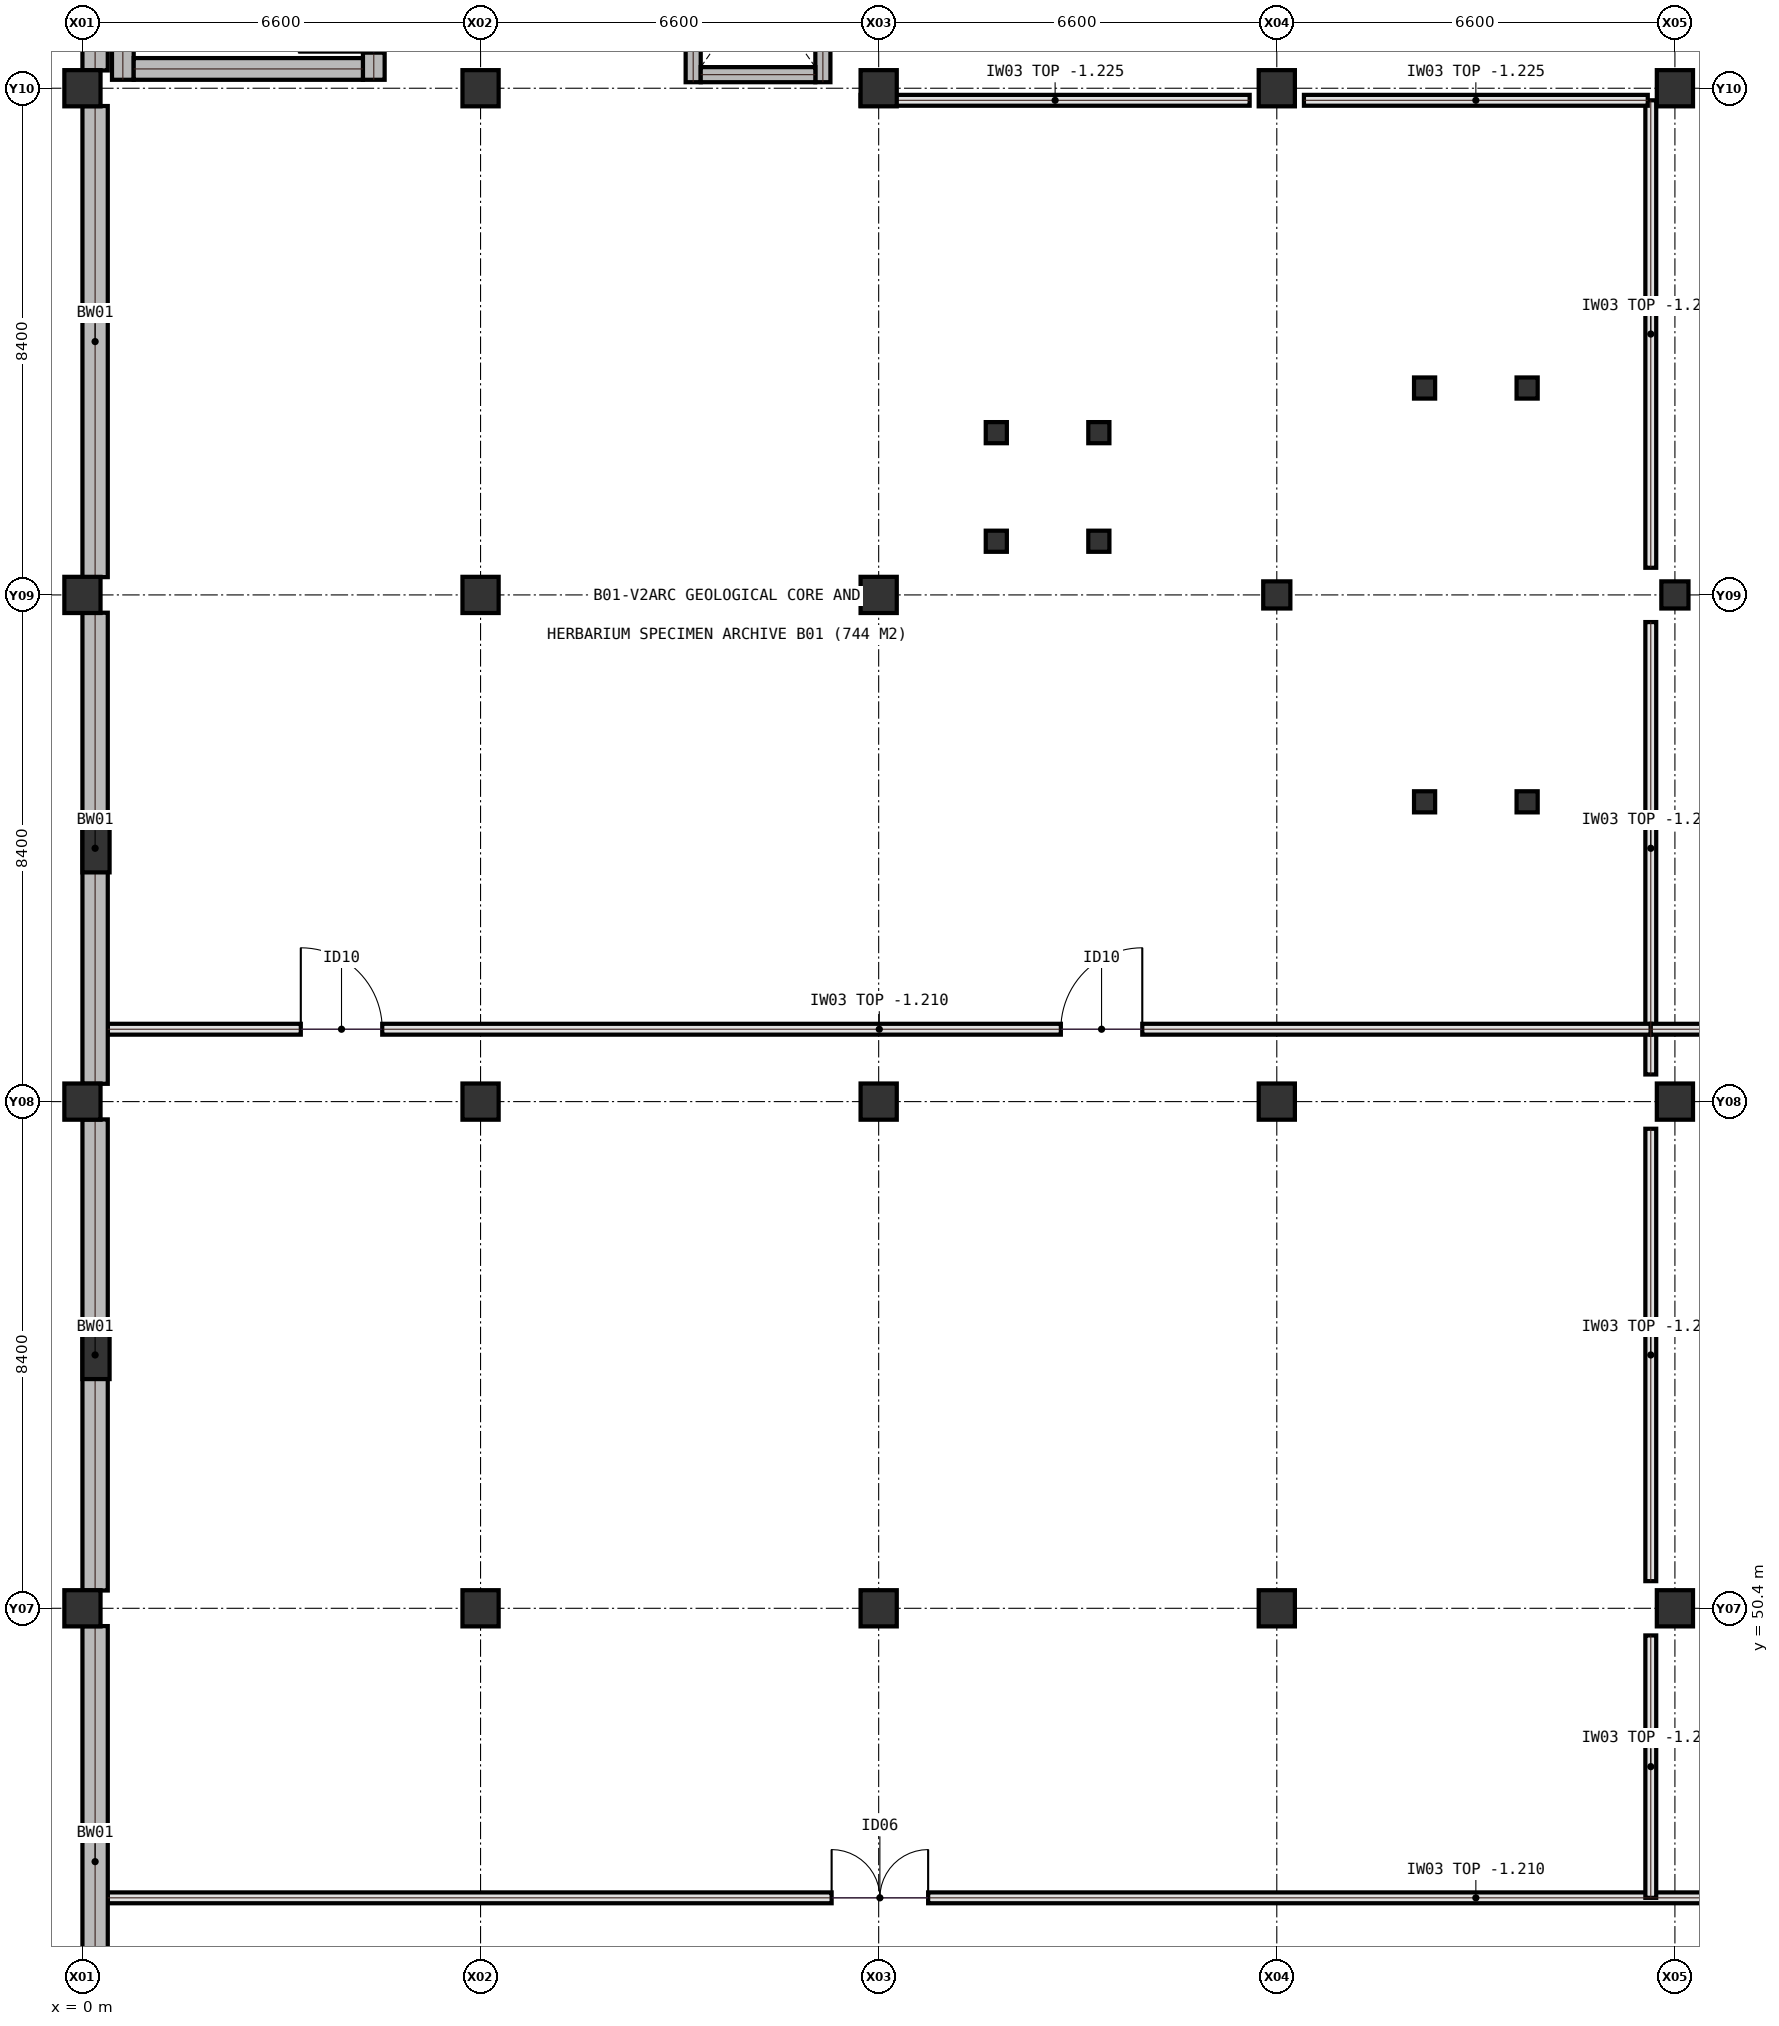
"""IFC4 building model, lengths in metres.
Left out: names, types, materials, properties, quantities, classifications, styles, units other than length and angle.
Written with IfcOpenShell. Run it as: python <this file> out.ifc"""

import sys

from ifc_helpers import new_model, si_unit, direction, frame, frame_2d, origin, origin_2d, place, context, subcontext, project, spatial, rectangle, extrude, element, fill, save


model = new_model("IFC4")
c1 = context("Model", 3, precision=1e-05, world=origin(), true_north=direction((0.0, 1.0)))
c2 = subcontext(c1, "Body", "Model", "MODEL_VIEW")
j1 = project(units=[si_unit("LENGTHUNIT", "METRE"), si_unit("PLANEANGLEUNIT", "RADIAN")], contexts=[c1])
p1 = place(None, origin())
s1 = spatial("IfcSite", under=j1, at=p1, CompositionType="ELEMENT")
p2 = place(p1, origin())
s2 = spatial("IfcBuilding", under=s1, at=p2, CompositionType="ELEMENT")
p3 = place(p2, frame((0.0, 0.0, -4.5)))
s3 = spatial("IfcBuildingStorey", under=s2, at=p3, CompositionType="ELEMENT", Elevation=-4.5)
for number, where, z_axis, x_axis in (
    (1, (0.0, 50.4, 0.0), (0.0, 0.0, 1.0), (1.0, 0.0, 0.0)),
    (2, (0.0, 58.8, 0.0), (0.0, 0.0, 1.0), (1.0, 0.0, 0.0)),
    (3, (0.0, 67.2, 0.0), (0.0, 0.0, 1.0), (1.0, 0.0, 0.0)),
    (4, (0.0, 75.6, 0.0), (0.0, 0.0, 1.0), (1.0, 0.0, 0.0)),
    (5, (6.6, 50.4, 0.0), (0.0, 0.0, 1.0), (1.0, 0.0, 0.0)),
    (6, (6.6, 58.8, 0.0), (0.0, 0.0, 1.0), (1.0, 0.0, 0.0)),
    (7, (6.6, 67.2, 0.0), (0.0, 0.0, 1.0), (1.0, 0.0, 0.0)),
    (8, (6.6, 75.6, 0.0), (0.0, 0.0, 1.0), (1.0, 0.0, 0.0)),
    (9, (13.2, 50.4, 0.0), (0.0, 0.0, 1.0), (1.0, 0.0, 0.0)),
    (10, (13.2, 58.8, 0.0), (0.0, 0.0, 1.0), (1.0, 0.0, 0.0)),
    (11, (13.2, 67.2, 0.0), (0.0, 0.0, 1.0), (1.0, 0.0, 0.0)),
    (12, (13.2, 75.6, 0.0), (0.0, 0.0, 1.0), (1.0, 0.0, 0.0)),
    (13, (19.8, 50.4, 0.0), (0.0, 0.0, 1.0), (1.0, 0.0, 0.0)),
    (14, (19.8, 58.8, 0.0), (0.0, 0.0, 1.0), (1.0, 0.0, 0.0)),
):
    element("IfcColumn", number, at=place(p3, frame(where, z_axis=z_axis, x_axis=x_axis)), inside=s3, PredefinedType="COLUMN", context=c2, shape_type="SweptSolid", body=[
        extrude(rectangle(XDim=0.6, YDim=0.6, at=origin_2d()), origin(), (0.0, 0.0, 1.0), 4.5),
    ])
p4 = place(p3, frame((19.8, 67.2, 0.0), z_axis=(0.0, 0.0, 1.0), x_axis=(1.0, 0.0, 0.0)))
e15 = element("IfcColumn", 15, at=p4, inside=s3, PredefinedType="COLUMN", context=c2, shape_type="SweptSolid", body=[
    extrude(rectangle(XDim=0.45, YDim=0.45, at=origin_2d()), origin(), (0.0, 0.0, 1.0), 4.5),
])
for number, where, z_axis, x_axis in (
    (16, (19.8, 75.6, 0.0), (0.0, 0.0, 1.0), (1.0, 0.0, 0.0)),
    (17, (26.4, 50.4, 0.0), (0.0, 0.0, 1.0), (1.0, 0.0, 0.0)),
    (18, (26.4, 58.8, 0.0), (0.0, 0.0, 1.0), (1.0, 0.0, 0.0)),
):
    element("IfcColumn", number, at=place(p3, frame(where, z_axis=z_axis, x_axis=x_axis)), inside=s3, PredefinedType="COLUMN", context=c2, shape_type="SweptSolid", body=[
        extrude(rectangle(XDim=0.6, YDim=0.6, at=origin_2d()), origin(), (0.0, 0.0, 1.0), 4.5),
    ])
p5 = place(p3, frame((26.4, 67.2, 0.0), z_axis=(0.0, 0.0, 1.0), x_axis=(1.0, 0.0, 0.0)))
e19 = element("IfcColumn", 19, at=p5, inside=s3, PredefinedType="COLUMN", context=c2, shape_type="SweptSolid", body=[
    extrude(rectangle(XDim=0.45, YDim=0.45, at=origin_2d()), origin(), (0.0, 0.0, 1.0), 4.5),
])
p6 = place(p3, frame((26.4, 75.6, 0.0), z_axis=(0.0, 0.0, 1.0), x_axis=(1.0, 0.0, 0.0)))
e20 = element("IfcColumn", 20, at=p6, inside=s3, PredefinedType="COLUMN", context=c2, shape_type="SweptSolid", body=[
    extrude(rectangle(XDim=0.6, YDim=0.6, at=origin_2d()), origin(), (0.0, 0.0, 1.0), 4.5),
])
for number, where, z_axis, x_axis in (
    (21, (0.225, 54.6, 0.0), (0.0, 0.0, 1.0), (1.0, 0.0, 0.0)),
    (22, (0.225, 63.0, 0.0), (0.0, 0.0, 1.0), (1.0, 0.0, 0.0)),
):
    element("IfcColumn", number, at=place(p3, frame(where, z_axis=z_axis, x_axis=x_axis)), inside=s3, PredefinedType="PILASTER", context=c2, shape_type="SweptSolid", body=[
        extrude(rectangle(XDim=0.45, YDim=0.8, at=origin_2d()), origin(), (0.0, 0.0, 1.0), 4.5),
    ])
p7 = place(p3, frame((0.42, 45.6, 0.0), z_axis=(0.0, 0.0, 1.0), x_axis=(1.0, 0.0, 0.0)))
e23 = element("IfcWall", 23, at=p7, inside=s3, PredefinedType="SOLIDWALL", context=c2, shape_type="SweptSolid", body=[
    extrude(rectangle(XDim=45.36, YDim=0.18, at=frame_2d((22.68, 0.0))), origin(), (0.0, 0.0, 1.0), 3.29),
])
p8 = place(p7, frame((12.0, 0.0, 0.0)))
e24 = element("IfcOpeningElement", 24, at=p8, cuts=e23, PredefinedType="OPENING", context=c2, shape_type="SweptSolid", body=[
    extrude(rectangle(XDim=1.6, YDim=2.2, at=frame_2d((0.8, 1.1))), frame((0.0, 0.1, 0.0), z_axis=(0.0, -1.0, 0.0), x_axis=(1.0, 0.0, 0.0)), (0.0, 0.0, 1.0), 0.2),
])
p9 = place(p7, frame((34.0, 0.0, 0.0)))
e25 = element("IfcOpeningElement", 25, at=p9, cuts=e23, PredefinedType="OPENING", context=c2, shape_type="SweptSolid", body=[
    extrude(rectangle(XDim=1.6, YDim=2.2, at=frame_2d((0.8, 1.1))), frame((0.0, 0.1, 0.0), z_axis=(0.0, -1.0, 0.0), x_axis=(1.0, 0.0, 0.0)), (0.0, 0.0, 1.0), 0.2),
])
p10 = place(p3, frame((26.0, 45.6, 0.0), z_axis=(0.0, 0.0, 1.0), x_axis=(0.0, 1.0, 0.0)))
e26 = element("IfcWall", 26, at=p10, inside=s3, PredefinedType="SOLIDWALL", context=c2, shape_type="SweptSolid", body=[
    extrude(rectangle(XDim=4.35, YDim=0.18, at=frame_2d((2.175, 0.0))), origin(), (0.0, 0.0, 1.0), 3.29),
])
for number, where, z_axis, x_axis in (
    (27, (26.0, 50.85, 0.0), (0.0, 0.0, 1.0), (0.0, 1.0, 0.0)),
    (28, (26.0, 59.25, 0.0), (0.0, 0.0, 1.0), (0.0, 1.0, 0.0)),
):
    element("IfcWall", number, at=place(p3, frame(where, z_axis=z_axis, x_axis=x_axis)), inside=s3, PredefinedType="SOLIDWALL", context=c2, shape_type="SweptSolid", body=[
        extrude(rectangle(XDim=7.5, YDim=0.18, at=frame_2d((3.75, 0.0))), origin(), (0.0, 0.0, 1.0), 3.29),
    ])
p11 = place(p3, frame((26.0, 67.65, 0.0), z_axis=(0.0, 0.0, 1.0), x_axis=(0.0, 1.0, 0.0)))
e29 = element("IfcWall", 29, at=p11, inside=s3, PredefinedType="SOLIDWALL", context=c2, shape_type="SweptSolid", body=[
    extrude(rectangle(XDim=7.75, YDim=0.18, at=frame_2d((3.875, 0.0))), origin(), (0.0, 0.0, 1.0), 3.29),
])
p12 = place(p3, frame((12.9, 75.4, 0.0), z_axis=(0.0, 0.0, 1.0), x_axis=(1.0, 0.0, 0.0)))
e30 = element("IfcWall", 30, at=p12, inside=s3, PredefinedType="SOLIDWALL", context=c2, shape_type="SweptSolid", body=[
    extrude(rectangle(XDim=6.45, YDim=0.18, at=frame_2d((3.225, 0.0))), origin(), (0.0, 0.0, 1.0), 3.275),
])
p13 = place(p3, frame((20.25, 75.4, 0.0), z_axis=(0.0, 0.0, 1.0), x_axis=(1.0, 0.0, 0.0)))
e31 = element("IfcWall", 31, at=p13, inside=s3, PredefinedType="SOLIDWALL", context=c2, shape_type="SweptSolid", body=[
    extrude(rectangle(XDim=5.7, YDim=0.18, at=frame_2d((2.85, 0.0))), origin(), (0.0, 0.0, 1.0), 3.275),
])
p14 = place(p3, frame((0.42, 60.0, 0.0), z_axis=(0.0, 0.0, 1.0), x_axis=(1.0, 0.0, 0.0)))
e32 = element("IfcWall", 32, at=p14, inside=s3, PredefinedType="SOLIDWALL", context=c2, shape_type="SweptSolid", body=[
    extrude(rectangle(XDim=25.58, YDim=0.18, at=frame_2d((12.79, 0.0))), origin(), (0.0, 0.0, 1.0), 3.29),
])
p15 = place(p14, frame((3.2, 0.0, 0.0)))
e33 = element("IfcOpeningElement", 33, at=p15, cuts=e32, PredefinedType="OPENING", context=c2, shape_type="SweptSolid", body=[
    extrude(rectangle(XDim=1.35, YDim=2.2, at=frame_2d((0.675, 1.1))), frame((0.0, 0.1, 0.0), z_axis=(0.0, -1.0, 0.0), x_axis=(1.0, 0.0, 0.0)), (0.0, 0.0, 1.0), 0.2),
])
p16 = place(p14, frame((15.8, 0.0, 0.0)))
e34 = element("IfcOpeningElement", 34, at=p16, cuts=e32, PredefinedType="OPENING", context=c2, shape_type="SweptSolid", body=[
    extrude(rectangle(XDim=1.35, YDim=2.2, at=frame_2d((0.675, 1.1))), frame((0.0, 0.1, 0.0), z_axis=(0.0, -1.0, 0.0), x_axis=(1.0, 0.0, 0.0)), (0.0, 0.0, 1.0), 0.2),
])
p17 = place(p3, frame((26.0, 60.0, 0.0), z_axis=(0.0, 0.0, 1.0), x_axis=(1.0, 0.0, 0.0)))
e35 = element("IfcWall", 35, at=p17, inside=s3, PredefinedType="SOLIDWALL", context=c2, shape_type="SweptSolid", body=[
    extrude(rectangle(XDim=19.85, YDim=0.18, at=frame_2d((9.925, 0.0))), origin(), (0.0, 0.0, 1.0), 3.29),
])
p18 = place(p17, frame((3.2, 0.0, 0.0)))
e36 = element("IfcOpeningElement", 36, at=p18, cuts=e35, PredefinedType="OPENING", context=c2, shape_type="SweptSolid", body=[
    extrude(rectangle(XDim=1.75, YDim=2.3, at=frame_2d((0.875, 1.15))), frame((0.0, 0.1, 0.0), z_axis=(0.0, -1.0, 0.0), x_axis=(1.0, 0.0, 0.0)), (0.0, 0.0, 1.0), 0.2),
])
p19 = place(p17, frame((10.2, 0.0, 0.0)))
e37 = element("IfcOpeningElement", 37, at=p19, cuts=e35, PredefinedType="OPENING", context=c2, shape_type="SweptSolid", body=[
    extrude(rectangle(XDim=1.75, YDim=2.3, at=frame_2d((0.875, 1.15))), frame((0.0, 0.1, 0.0), z_axis=(0.0, -1.0, 0.0), x_axis=(1.0, 0.0, 0.0)), (0.0, 0.0, 1.0), 0.2),
])
p20 = place(p3, frame((0.21, 50.105, 0.0), z_axis=(0.0, 0.0, 1.0), x_axis=(0.0, -1.0, 0.0)))
e38 = element("IfcWall", 38, at=p20, inside=s3, PredefinedType="SOLIDWALL", context=c2, shape_type="SweptSolid", body=[
    extrude(rectangle(XDim=7.81, YDim=0.42, at=frame_2d((3.905, 0.0))), origin(), (0.0, 0.0, 1.0), 4.14),
])
p21 = place(p3, frame((0.21, 58.505, 0.0), z_axis=(0.0, 0.0, 1.0), x_axis=(0.0, -1.0, 0.0)))
e39 = element("IfcWall", 39, at=p21, inside=s3, PredefinedType="SOLIDWALL", context=c2, shape_type="SweptSolid", body=[
    extrude(rectangle(XDim=7.81, YDim=0.42, at=frame_2d((3.905, 0.0))), origin(), (0.0, 0.0, 1.0), 4.14),
])
p22 = place(p3, frame((0.21, 66.905, 0.0), z_axis=(0.0, 0.0, 1.0), x_axis=(0.0, -1.0, 0.0)))
e40 = element("IfcWall", 40, at=p22, inside=s3, PredefinedType="SOLIDWALL", context=c2, shape_type="SweptSolid", body=[
    extrude(rectangle(XDim=7.81, YDim=0.42, at=frame_2d((3.905, 0.0))), origin(), (0.0, 0.0, 1.0), 4.14),
])
p23 = place(p3, frame((0.21, 75.305, 0.0), z_axis=(0.0, 0.0, 1.0), x_axis=(0.0, -1.0, 0.0)))
e41 = element("IfcWall", 41, at=p23, inside=s3, PredefinedType="SOLIDWALL", context=c2, shape_type="SweptSolid", body=[
    extrude(rectangle(XDim=7.81, YDim=0.42, at=frame_2d((3.905, 0.0))), origin(), (0.0, 0.0, 1.0), 4.14),
])
p24 = place(p3, frame((0.21, 83.705, 0.0), z_axis=(0.0, 0.0, 1.0), x_axis=(0.0, -1.0, 0.0)))
e42 = element("IfcWall", 42, at=p24, inside=s3, PredefinedType="SOLIDWALL", context=c2, shape_type="SweptSolid", body=[
    extrude(rectangle(XDim=7.81, YDim=0.42, at=frame_2d((3.905, 0.0))), origin(), (0.0, 0.0, 1.0), 4.14),
])
p25 = place(p3, frame((0.67, 75.74, 0.0), z_axis=(0.0, 0.0, 1.0), x_axis=(0.0, 1.0, 0.0)))
e43 = element("IfcWall", 43, at=p25, inside=s3, PredefinedType="SHEAR", context=c2, shape_type="SweptSolid", body=[
    extrude(rectangle(XDim=8.05, YDim=0.36, at=frame_2d((4.025, 0.0))), origin(), (0.0, 0.0, 1.0), 4.14),
])
p26 = place(p3, frame((4.83, 75.74, 0.0), z_axis=(0.0, 0.0, 1.0), x_axis=(0.0, 1.0, 0.0)))
e44 = element("IfcWall", 44, at=p26, inside=s3, PredefinedType="SHEAR", context=c2, shape_type="SweptSolid", body=[
    extrude(rectangle(XDim=8.05, YDim=0.36, at=frame_2d((4.025, 0.0))), origin(), (0.0, 0.0, 1.0), 4.14),
])
p27 = place(p26, frame((0.45, 0.0, 0.0)))
e45 = element("IfcOpeningElement", 45, at=p27, cuts=e44, PredefinedType="OPENING", context=c2, shape_type="SweptSolid", body=[
    extrude(rectangle(XDim=1.25, YDim=2.15, at=frame_2d((0.625, 1.075))), frame((0.0, 0.19, 0.0), z_axis=(0.0, -1.0, 0.0), x_axis=(1.0, 0.0, 0.0)), (0.0, 0.0, 1.0), 0.38),
])
p28 = place(p3, frame((0.85, 75.92, 0.0), z_axis=(0.0, 0.0, 1.0), x_axis=(1.0, 0.0, 0.0)))
e46 = element("IfcWall", 46, at=p28, inside=s3, PredefinedType="SHEAR", context=c2, shape_type="SweptSolid", body=[
    extrude(rectangle(XDim=3.8, YDim=0.36, at=frame_2d((1.9, 0.0))), origin(), (0.0, 0.0, 1.0), 4.14),
])
for number, where, z_axis, x_axis in (
    (47, (15.15, 68.09, 0.0), (0.0, 0.0, 1.0), (1.0, 0.0, 0.0)),
    (48, (16.85, 68.09, 0.0), (0.0, 0.0, 1.0), (1.0, 0.0, 0.0)),
    (49, (16.85, 69.89, 0.0), (0.0, 0.0, 1.0), (1.0, 0.0, 0.0)),
    (50, (15.15, 69.89, 0.0), (0.0, 0.0, 1.0), (1.0, 0.0, 0.0)),
    (51, (22.25, 63.77, 0.0), (0.0, 0.0, 1.0), (1.0, 0.0, 0.0)),
    (52, (23.95, 63.77, 0.0), (0.0, 0.0, 1.0), (1.0, 0.0, 0.0)),
    (53, (23.95, 70.63, 0.0), (0.0, 0.0, 1.0), (1.0, 0.0, 0.0)),
    (54, (22.25, 70.63, 0.0), (0.0, 0.0, 1.0), (1.0, 0.0, 0.0)),
):
    element("IfcColumn", number, at=place(p3, frame(where, z_axis=z_axis, x_axis=x_axis)), inside=s3, PredefinedType="COLUMN", context=c2, shape_type="SweptSolid", body=[
        extrude(rectangle(XDim=0.35, YDim=0.35, at=origin_2d()), origin(), (0.0, 0.0, 1.0), 4.5),
    ])
p29 = place(p3, frame((10.125, 75.7, 0.0), z_axis=(0.0, 0.0, 1.0), x_axis=(0.0, 1.0, 0.0)))
e55 = element("IfcWall", 55, at=p29, inside=s3, PredefinedType="SHEAR", context=c2, shape_type="SweptSolid", body=[
    extrude(rectangle(XDim=3.2, YDim=0.25, at=frame_2d((1.6, 0.0))), origin(), (0.0, 0.0, 1.0), 4.14),
])
p30 = place(p29, frame((1.05, 0.0, 0.0)))
e56 = element("IfcOpeningElement", 56, at=p30, cuts=e55, PredefinedType="OPENING", context=c2, shape_type="SweptSolid", body=[
    extrude(rectangle(XDim=1.1, YDim=2.15, at=frame_2d((0.55, 1.075))), frame((0.0, 0.135, 0.0), z_axis=(0.0, -1.0, 0.0), x_axis=(1.0, 0.0, 0.0)), (0.0, 0.0, 1.0), 0.27),
])
p31 = place(p3, frame((12.275, 75.7, 0.0), z_axis=(0.0, 0.0, 1.0), x_axis=(0.0, 1.0, 0.0)))
e57 = element("IfcWall", 57, at=p31, inside=s3, PredefinedType="SHEAR", context=c2, shape_type="SweptSolid", body=[
    extrude(rectangle(XDim=3.2, YDim=0.25, at=frame_2d((1.6, 0.0))), origin(), (0.0, 0.0, 1.0), 4.14),
])
p32 = place(p3, frame((10.25, 75.825, 0.0), z_axis=(0.0, 0.0, 1.0), x_axis=(1.0, 0.0, 0.0)))
e58 = element("IfcWall", 58, at=p32, inside=s3, PredefinedType="SHEAR", context=c2, shape_type="SweptSolid", body=[
    extrude(rectangle(XDim=1.9, YDim=0.25, at=frame_2d((0.95, 0.0))), origin(), (0.0, 0.0, 1.0), 4.14),
])
p33 = place(p8, origin())
e59 = element("IfcDoor", 59, at=p33, inside=s3, OperationType="DOUBLE_DOOR_SINGLE_SWING", PredefinedType="DOOR", context=c2, shape_type="SweptSolid", body=[
    extrude(rectangle(XDim=1.6, YDim=2.2, at=frame_2d((0.8, 1.1))), frame((0.0, 0.025, 0.0), z_axis=(0.0, -1.0, 0.0), x_axis=(1.0, 0.0, 0.0)), (0.0, 0.0, 1.0), 0.05),
])
fill(e24, e59)
p34 = place(p15, origin())
e60 = element("IfcDoor", 60, at=p34, inside=s3, OperationType="SINGLE_SWING_LEFT", PredefinedType="DOOR", context=c2, shape_type="SweptSolid", body=[
    extrude(rectangle(XDim=1.35, YDim=2.2, at=frame_2d((0.675, 1.1))), frame((0.0, 0.025, 0.0), z_axis=(0.0, -1.0, 0.0), x_axis=(1.0, 0.0, 0.0)), (0.0, 0.0, 1.0), 0.05),
])
fill(e33, e60)
p35 = place(p16, origin())
e61 = element("IfcDoor", 61, at=p35, inside=s3, OperationType="SINGLE_SWING_RIGHT", PredefinedType="DOOR", context=c2, shape_type="SweptSolid", body=[
    extrude(rectangle(XDim=1.35, YDim=2.2, at=frame_2d((0.675, 1.1))), frame((0.0, 0.025, 0.0), z_axis=(0.0, -1.0, 0.0), x_axis=(1.0, 0.0, 0.0)), (0.0, 0.0, 1.0), 0.05),
])
fill(e34, e61)
p36 = place(p27, origin())
e62 = element("IfcDoor", 62, at=p36, inside=s3, OperationType="SINGLE_SWING_LEFT", PredefinedType="DOOR", context=c2, shape_type="SweptSolid", body=[
    extrude(rectangle(XDim=1.25, YDim=2.15, at=frame_2d((0.625, 1.075))), frame((0.0, 0.025, 0.0), z_axis=(0.0, -1.0, 0.0), x_axis=(1.0, 0.0, 0.0)), (0.0, 0.0, 1.0), 0.05),
])
fill(e45, e62)
save(model, sys.argv[1])
